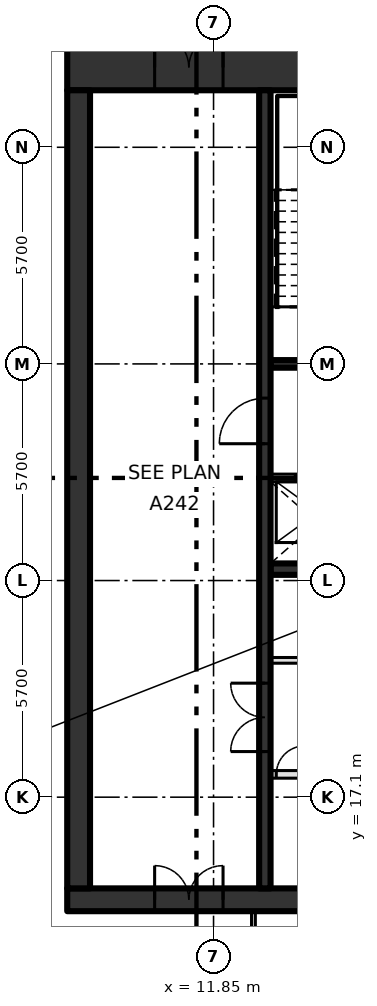
"""IFC4 building model, lengths in metres.
Left out: names, types, materials, properties, quantities, classifications, styles, units other than length and angle.
Written with IfcOpenShell. Run it as: python <this file> out.ifc"""

import sys

from ifc_helpers import new_model, si_unit, direction, frame, frame_2d, origin, place, context, subcontext, project, spatial, rectangle, extrude, element, fill, save


model = new_model("IFC4")
c1 = context("Model", 3, precision=1e-05, world=origin(), true_north=direction((0.0, 1.0)))
c2 = subcontext(c1, "Body", "Model", "MODEL_VIEW")
j1 = project(units=[si_unit("LENGTHUNIT", "METRE"), si_unit("PLANEANGLEUNIT", "RADIAN")], contexts=[c1])
p1 = place(None, origin())
s1 = spatial("IfcSite", under=j1, at=p1, CompositionType="ELEMENT")
p2 = place(p1, origin())
s2 = spatial("IfcBuilding", under=s1, at=p2, CompositionType="ELEMENT")
p3 = place(p2, frame((0.0, 0.0, 315.0)))
s3 = spatial("IfcBuildingStorey", under=s2, at=p3, CompositionType="ELEMENT", Elevation=315.0)
p4 = place(p3, frame((8.0, 14.4, -0.3), z_axis=(0.0, 0.0, 1.0), x_axis=(1.0, 0.0, 0.0)))
e1 = element("IfcWall", 1, at=p4, inside=s3, PredefinedType="SHEAR", context=c2, shape_type="SweptSolid", body=[
    extrude(rectangle(XDim=22.8, YDim=0.6, at=frame_2d((11.4, 0.0))), origin(), (0.0, 0.0, 1.0), 4.2),
])
p5 = place(p4, frame((2.3, 0.0, 0.3)))
e2 = element("IfcOpeningElement", 2, at=p5, cuts=e1, PredefinedType="OPENING", context=c2, shape_type="SweptSolid", body=[
    extrude(rectangle(XDim=1.8, YDim=2.1, at=frame_2d((0.9, 1.05))), frame((0.0, 0.31, 0.0), z_axis=(0.0, -1.0, 0.0), x_axis=(1.0, 0.0, 0.0)), (0.0, 0.0, 1.0), 0.62),
])
p6 = place(p3, frame((8.0, 36.3, -0.3), z_axis=(0.0, 0.0, 1.0), x_axis=(1.0, 0.0, 0.0)))
e3 = element("IfcWall", 3, at=p6, inside=s3, PredefinedType="SHEAR", context=c2, shape_type="SweptSolid", body=[
    extrude(rectangle(XDim=22.8, YDim=1.2, at=frame_2d((11.4, 0.0))), origin(), (0.0, 0.0, 1.0), 4.2),
])
p7 = place(p6, frame((2.3, 0.0, 0.3)))
e4 = element("IfcOpeningElement", 4, at=p7, cuts=e3, PredefinedType="OPENING", context=c2, shape_type="SweptSolid", body=[
    extrude(rectangle(XDim=1.8, YDim=2.1, at=frame_2d((0.9, 1.05))), frame((0.0, 0.61, 0.0), z_axis=(0.0, -1.0, 0.0), x_axis=(1.0, 0.0, 0.0)), (0.0, 0.0, 1.0), 1.22),
])
p8 = place(p3, frame((8.3, 14.7, -0.3), z_axis=(0.0, 0.0, 1.0), x_axis=(0.0, 1.0, 0.0)))
e5 = element("IfcWall", 5, at=p8, inside=s3, PredefinedType="SHEAR", context=c2, shape_type="SweptSolid", body=[
    extrude(rectangle(XDim=21.0, YDim=0.6, at=frame_2d((10.5, 0.0))), origin(), (0.0, 0.0, 1.0), 4.2),
])
p9 = place(p3, frame((13.35, 17.7, 0.0), z_axis=(0.0, 0.0, 1.0), x_axis=(1.0, 0.0, 0.0)))
e6 = element("IfcWall", 6, at=p9, inside=s3, PredefinedType="SOLIDWALL", context=c2, shape_type="SweptSolid", body=[
    extrude(rectangle(XDim=13.425, YDim=0.2, at=frame_2d((6.712, 0.0))), origin(), (0.0, 0.0, 1.0), 3.9),
])
p10 = place(p9, frame((2.0, 0.0, 0.0)))
e7 = element("IfcOpeningElement", 7, at=p10, cuts=e6, PredefinedType="OPENING", context=c2, shape_type="SweptSolid", body=[
    extrude(rectangle(XDim=1.1, YDim=2.1, at=frame_2d((0.55, 1.05))), frame((0.0, 0.11, 0.0), z_axis=(0.0, -1.0, 0.0), x_axis=(1.0, 0.0, 0.0)), (0.0, 0.0, 1.0), 0.22),
])
p11 = place(p9, frame((4.7, 0.0, 0.0)))
e8 = element("IfcOpeningElement", 8, at=p11, cuts=e6, PredefinedType="OPENING", context=c2, shape_type="SweptSolid", body=[
    extrude(rectangle(XDim=1.1, YDim=2.1, at=frame_2d((0.55, 1.05))), frame((0.0, 0.11, 0.0), z_axis=(0.0, -1.0, 0.0), x_axis=(1.0, 0.0, 0.0)), (0.0, 0.0, 1.0), 0.22),
])
p12 = place(p9, frame((7.4, 0.0, 0.0)))
e9 = element("IfcOpeningElement", 9, at=p12, cuts=e6, PredefinedType="OPENING", context=c2, shape_type="SweptSolid", body=[
    extrude(rectangle(XDim=1.1, YDim=2.1, at=frame_2d((0.55, 1.05))), frame((0.0, 0.11, 0.0), z_axis=(0.0, -1.0, 0.0), x_axis=(1.0, 0.0, 0.0)), (0.0, 0.0, 1.0), 0.22),
])
p13 = place(p9, frame((10.1, 0.0, 0.0)))
e10 = element("IfcOpeningElement", 10, at=p13, cuts=e6, PredefinedType="OPENING", context=c2, shape_type="SweptSolid", body=[
    extrude(rectangle(XDim=1.1, YDim=2.1, at=frame_2d((0.55, 1.05))), frame((0.0, 0.11, 0.0), z_axis=(0.0, -1.0, 0.0), x_axis=(1.0, 0.0, 0.0)), (0.0, 0.0, 1.0), 0.22),
])
p14 = place(p9, frame((0.15, 0.0, 0.0)))
e11 = element("IfcOpeningElement", 11, at=p14, cuts=e6, PredefinedType="OPENING", context=c2, shape_type="SweptSolid", body=[
    extrude(rectangle(XDim=0.75, YDim=2.1, at=frame_2d((0.375, 1.05))), frame((0.0, 0.11, 0.0), z_axis=(0.0, -1.0, 0.0), x_axis=(1.0, 0.0, 0.0)), (0.0, 0.0, 1.0), 0.22),
])
p15 = place(p9, frame((12.3, 0.0, 0.0)))
e12 = element("IfcOpeningElement", 12, at=p15, cuts=e6, PredefinedType="OPENING", context=c2, shape_type="SweptSolid", body=[
    extrude(rectangle(XDim=0.75, YDim=2.1, at=frame_2d((0.375, 1.05))), frame((0.0, 0.11, 0.0), z_axis=(0.0, -1.0, 0.0), x_axis=(1.0, 0.0, 0.0)), (0.0, 0.0, 1.0), 0.22),
])
p16 = place(p3, frame((13.35, 20.7, 0.0), z_axis=(0.0, 0.0, 1.0), x_axis=(1.0, 0.0, 0.0)))
e13 = element("IfcWall", 13, at=p16, inside=s3, PredefinedType="PARTITIONING", context=c2, shape_type="SweptSolid", body=[
    extrude(rectangle(XDim=13.425, YDim=0.15, at=frame_2d((6.712, 0.0))), origin(), (0.0, 0.0, 1.0), 3.9),
])
p17 = place(p16, frame((3.45, 0.0, 0.0)))
e14 = element("IfcOpeningElement", 14, at=p17, cuts=e13, PredefinedType="OPENING", context=c2, shape_type="SweptSolid", body=[
    extrude(rectangle(XDim=0.9, YDim=2.1, at=frame_2d((0.45, 1.05))), frame((0.0, 0.085, 0.0), z_axis=(0.0, -1.0, 0.0), x_axis=(1.0, 0.0, 0.0)), (0.0, 0.0, 1.0), 0.17),
])
p18 = place(p16, frame((10.2, 0.0, 0.0)))
e15 = element("IfcOpeningElement", 15, at=p18, cuts=e13, PredefinedType="OPENING", context=c2, shape_type="SweptSolid", body=[
    extrude(rectangle(XDim=0.9, YDim=2.1, at=frame_2d((0.45, 1.05))), frame((0.0, 0.085, 0.0), z_axis=(0.0, -1.0, 0.0), x_axis=(1.0, 0.0, 0.0)), (0.0, 0.0, 1.0), 0.17),
])
p19 = place(p3, frame((13.35, 23.1, 0.0), z_axis=(0.0, 0.0, 1.0), x_axis=(1.0, 0.0, 0.0)))
e16 = element("IfcWall", 16, at=p19, inside=s3, PredefinedType="SHEAR", context=c2, shape_type="SweptSolid", body=[
    extrude(rectangle(XDim=16.85, YDim=0.3, at=frame_2d((8.425, 0.0))), origin(), (0.0, 0.0, 1.0), 3.9),
])
p20 = place(p3, frame((13.35, 25.5, 0.0), z_axis=(0.0, 0.0, 1.0), x_axis=(1.0, 0.0, 0.0)))
e17 = element("IfcWall", 17, at=p20, inside=s3, PredefinedType="SOLIDWALL", context=c2, shape_type="SweptSolid", body=[
    extrude(rectangle(XDim=16.85, YDim=0.2, at=frame_2d((8.425, 0.0))), origin(), (0.0, 0.0, 1.0), 3.9),
])
p21 = place(p20, frame((0.65, 0.0, 0.0)))
e18 = element("IfcOpeningElement", 18, at=p21, cuts=e17, PredefinedType="OPENING", context=c2, shape_type="SweptSolid", body=[
    extrude(rectangle(XDim=1.1, YDim=2.1, at=frame_2d((0.55, 1.05))), frame((0.0, 0.11, 0.0), z_axis=(0.0, -1.0, 0.0), x_axis=(1.0, 0.0, 0.0)), (0.0, 0.0, 1.0), 0.22),
])
p22 = place(p20, frame((3.35, 0.0, 0.0)))
e19 = element("IfcOpeningElement", 19, at=p22, cuts=e17, PredefinedType="OPENING", context=c2, shape_type="SweptSolid", body=[
    extrude(rectangle(XDim=1.1, YDim=2.1, at=frame_2d((0.55, 1.05))), frame((0.0, 0.11, 0.0), z_axis=(0.0, -1.0, 0.0), x_axis=(1.0, 0.0, 0.0)), (0.0, 0.0, 1.0), 0.22),
])
p23 = place(p20, frame((6.05, 0.0, 0.0)))
e20 = element("IfcOpeningElement", 20, at=p23, cuts=e17, PredefinedType="OPENING", context=c2, shape_type="SweptSolid", body=[
    extrude(rectangle(XDim=1.1, YDim=2.1, at=frame_2d((0.55, 1.05))), frame((0.0, 0.11, 0.0), z_axis=(0.0, -1.0, 0.0), x_axis=(1.0, 0.0, 0.0)), (0.0, 0.0, 1.0), 0.22),
])
p24 = place(p20, frame((8.75, 0.0, 0.0)))
e21 = element("IfcOpeningElement", 21, at=p24, cuts=e17, PredefinedType="OPENING", context=c2, shape_type="SweptSolid", body=[
    extrude(rectangle(XDim=1.1, YDim=2.1, at=frame_2d((0.55, 1.05))), frame((0.0, 0.11, 0.0), z_axis=(0.0, -1.0, 0.0), x_axis=(1.0, 0.0, 0.0)), (0.0, 0.0, 1.0), 0.22),
])
p25 = place(p20, frame((13.0, 0.0, 0.0)))
e22 = element("IfcOpeningElement", 22, at=p25, cuts=e17, PredefinedType="OPENING", context=c2, shape_type="SweptSolid", body=[
    extrude(rectangle(XDim=0.9, YDim=2.1, at=frame_2d((0.45, 1.05))), frame((0.0, 0.11, 0.0), z_axis=(0.0, -1.0, 0.0), x_axis=(1.0, 0.0, 0.0)), (0.0, 0.0, 1.0), 0.22),
])
p26 = place(p3, frame((13.35, 28.5, 0.0), z_axis=(0.0, 0.0, 1.0), x_axis=(1.0, 0.0, 0.0)))
e23 = element("IfcWall", 23, at=p26, inside=s3, PredefinedType="SOLIDWALL", context=c2, shape_type="SweptSolid", body=[
    extrude(rectangle(XDim=6.75, YDim=0.2, at=frame_2d((3.375, 0.0))), origin(), (0.0, 0.0, 1.0), 3.9),
])
p27 = place(p26, frame((0.95, 0.0, 0.0)))
e24 = element("IfcOpeningElement", 24, at=p27, cuts=e23, PredefinedType="OPENING", context=c2, shape_type="SweptSolid", body=[
    extrude(rectangle(XDim=1.2, YDim=2.1, at=frame_2d((0.6, 1.05))), frame((0.0, 0.11, 0.0), z_axis=(0.0, -1.0, 0.0), x_axis=(1.0, 0.0, 0.0)), (0.0, 0.0, 1.0), 0.22),
])
p28 = place(p26, frame((3.75, 0.0, 0.0)))
e25 = element("IfcOpeningElement", 25, at=p28, cuts=e23, PredefinedType="OPENING", context=c2, shape_type="SweptSolid", body=[
    extrude(rectangle(XDim=1.1, YDim=2.1, at=frame_2d((0.55, 1.05))), frame((0.0, 0.11, 0.0), z_axis=(0.0, -1.0, 0.0), x_axis=(1.0, 0.0, 0.0)), (0.0, 0.0, 1.0), 0.22),
])
p29 = place(p3, frame((13.2, 14.7, 0.0), z_axis=(0.0, 0.0, 1.0), x_axis=(0.0, 1.0, 0.0)))
e26 = element("IfcWall", 26, at=p29, inside=s3, PredefinedType="SHEAR", context=c2, shape_type="SweptSolid", body=[
    extrude(rectangle(XDim=21.0, YDim=0.3, at=frame_2d((10.5, 0.0))), origin(), (0.0, 0.0, 1.0), 3.9),
])
p30 = place(p29, frame((3.6, 0.0, 0.0)))
e27 = element("IfcOpeningElement", 27, at=p30, cuts=e26, PredefinedType="OPENING", context=c2, shape_type="SweptSolid", body=[
    extrude(rectangle(XDim=1.8, YDim=2.1, at=frame_2d((0.9, 1.05))), frame((0.0, 0.16, 0.0), z_axis=(0.0, -1.0, 0.0), x_axis=(1.0, 0.0, 0.0)), (0.0, 0.0, 1.0), 0.32),
])
p31 = place(p29, frame((11.7, 0.0, 0.0)))
e28 = element("IfcOpeningElement", 28, at=p31, cuts=e26, PredefinedType="OPENING", context=c2, shape_type="SweptSolid", body=[
    extrude(rectangle(XDim=1.2, YDim=2.1, at=frame_2d((0.6, 1.05))), frame((0.0, 0.16, 0.0), z_axis=(0.0, -1.0, 0.0), x_axis=(1.0, 0.0, 0.0)), (0.0, 0.0, 1.0), 0.32),
])
p32 = place(p3, frame((12.9, 10.078, 0.0), z_axis=(0.0, 0.0, 1.0), x_axis=(0.0, 1.0, 0.0)))
e29 = element("IfcWall", 29, at=p32, inside=s3, PredefinedType="PARTITIONING", context=c2, shape_type="SweptSolid", body=[
    extrude(rectangle(XDim=4.022, YDim=0.1, at=frame_2d((2.011, 0.0))), origin(), (0.0, 0.0, 1.0), 3.9),
])
p33 = place(p21, origin())
e30 = element("IfcDoor", 30, at=p33, inside=s3, OperationType="SLIDING_TO_LEFT", PredefinedType="DOOR", context=c2, shape_type="SweptSolid", body=[
    extrude(rectangle(XDim=1.1, YDim=2.1, at=frame_2d((0.55, 1.05))), frame((0.0, 0.025, 0.0), z_axis=(0.0, -1.0, 0.0), x_axis=(1.0, 0.0, 0.0)), (0.0, 0.0, 1.0), 0.05),
])
fill(e18, e30)
p34 = place(p14, origin())
e31 = element("IfcDoor", 31, at=p34, inside=s3, OperationType="SINGLE_SWING_RIGHT", PredefinedType="DOOR", context=c2, shape_type="SweptSolid", body=[
    extrude(rectangle(XDim=0.75, YDim=2.1, at=frame_2d((0.375, 1.05))), frame((0.0, 0.025, 0.0), z_axis=(0.0, -1.0, 0.0), x_axis=(1.0, 0.0, 0.0)), (0.0, 0.0, 1.0), 0.05),
])
fill(e11, e31)
p35 = place(p30, origin())
e32 = element("IfcDoor", 32, at=p35, inside=s3, OperationType="DOUBLE_DOOR_SINGLE_SWING", PredefinedType="DOOR", context=c2, shape_type="SweptSolid", body=[
    extrude(rectangle(XDim=1.8, YDim=2.1, at=frame_2d((0.9, 1.05))), frame((0.0, 0.025, 0.0), z_axis=(0.0, -1.0, 0.0), x_axis=(1.0, 0.0, 0.0)), (0.0, 0.0, 1.0), 0.05),
])
fill(e27, e32)
p36 = place(p31, origin())
e33 = element("IfcDoor", 33, at=p36, inside=s3, OperationType="SINGLE_SWING_LEFT", PredefinedType="DOOR", context=c2, shape_type="SweptSolid", body=[
    extrude(rectangle(XDim=1.2, YDim=2.1, at=frame_2d((0.6, 1.05))), frame((0.0, 0.025, 0.0), z_axis=(0.0, -1.0, 0.0), x_axis=(1.0, 0.0, 0.0)), (0.0, 0.0, 1.0), 0.05),
])
fill(e28, e33)
p37 = place(p7, origin())
e34 = element("IfcDoor", 34, at=p37, inside=s3, OperationType="DOUBLE_DOOR_SINGLE_SWING", PredefinedType="DOOR", context=c2, shape_type="SweptSolid", body=[
    extrude(rectangle(XDim=1.8, YDim=2.1, at=frame_2d((0.9, 1.05))), frame((0.0, 0.025, 0.0), z_axis=(0.0, -1.0, 0.0), x_axis=(1.0, 0.0, 0.0)), (0.0, 0.0, 1.0), 0.05),
])
fill(e4, e34)
p38 = place(p5, origin())
e35 = element("IfcDoor", 35, at=p38, inside=s3, OperationType="DOUBLE_DOOR_SINGLE_SWING", PredefinedType="DOOR", context=c2, shape_type="SweptSolid", body=[
    extrude(rectangle(XDim=1.8, YDim=2.1, at=frame_2d((0.9, 1.05))), frame((0.0, 0.025, 0.0), z_axis=(0.0, -1.0, 0.0), x_axis=(1.0, 0.0, 0.0)), (0.0, 0.0, 1.0), 0.05),
])
fill(e2, e35)
save(model, sys.argv[1])
